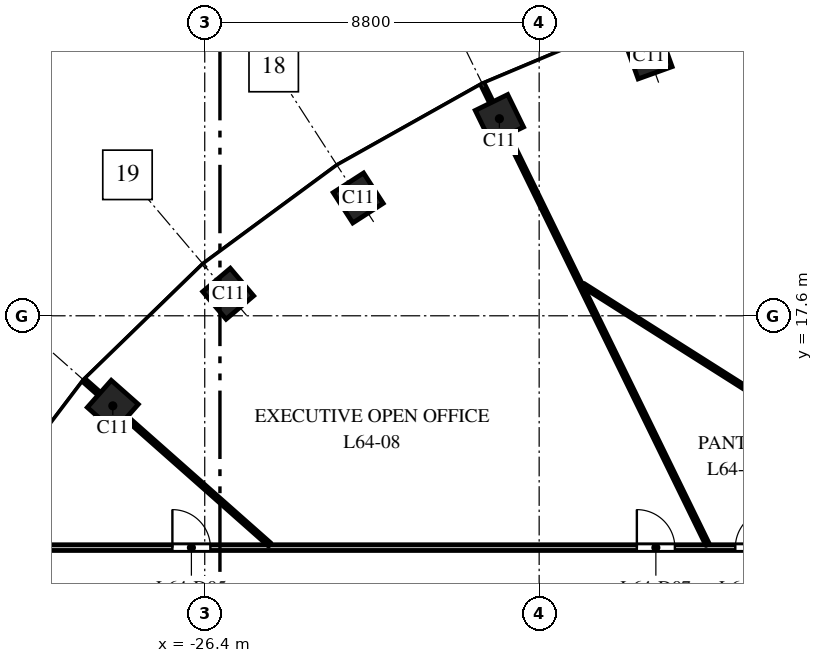
"""IFC4 building model, lengths in metres.
Left out: names, types, materials, properties, quantities, classifications, styles, units other than length and angle.
Written with IfcOpenShell. Run it as: python <this file> out.ifc"""

import sys

from ifc_helpers import new_model, si_unit, direction, frame, frame_2d, origin, origin_2d, place, context, subcontext, project, spatial, rectangle, extrude, element, fill, save


model = new_model("IFC4")
c1 = context("Model", 3, precision=1e-05, world=origin(), true_north=direction((0.0, 1.0)))
c2 = subcontext(c1, "Body", "Model", "MODEL_VIEW")
j1 = project(units=[si_unit("LENGTHUNIT", "METRE"), si_unit("PLANEANGLEUNIT", "RADIAN")], contexts=[c1])
p1 = place(None, origin())
s1 = spatial("IfcSite", under=j1, at=p1, CompositionType="ELEMENT")
p2 = place(p1, origin())
s2 = spatial("IfcBuilding", under=s1, at=p2, CompositionType="ELEMENT")
p3 = place(p2, frame((0.0, 0.0, 299.0)))
s3 = spatial("IfcBuildingStorey", under=s2, at=p3, CompositionType="ELEMENT", Elevation=299.0)
for number, where, z_axis, x_axis in (
    (1, (-14.709, 24.441, 0.0), (0.0, 0.0, 1.0), (-0.941, -0.338, 0.0)),
    (2, (-18.646, 22.785, 0.0), (0.0, 0.0, 1.0), (-0.898, -0.439, 0.0)),
    (3, (-22.362, 20.7, 0.0), (0.0, 0.0, 1.0), (-0.84, -0.542, 0.0)),
    (4, (-25.783, 18.18, 0.0), (0.0, 0.0, 1.0), (-0.763, -0.646, 0.0)),
    (5, (-28.819, 15.23, 0.0), (0.0, 0.0, 1.0), (-0.663, -0.749, 0.0)),
):
    element("IfcColumn", number, at=place(p3, frame(where, z_axis=z_axis, x_axis=x_axis)), inside=s3, PredefinedType="COLUMN", context=c2, shape_type="SweptSolid", body=[
        extrude(rectangle(XDim=0.95, YDim=0.95, at=origin_2d()), origin(), (0.0, 0.0, 1.0), 4.0),
    ])
p4 = place(p3, frame((-31.5, 11.5, 0.0), z_axis=(0.0, 0.0, 1.0), x_axis=(1.0, 0.0, 0.0)))
e6 = element("IfcWall", 6, at=p4, inside=s3, PredefinedType="PARTITIONING", context=c2, shape_type="SweptSolid", body=[
    extrude(rectangle(XDim=29.768, YDim=0.15, at=frame_2d((14.884, 0.0))), origin(), (0.0, 0.0, 1.0), 2.75),
])
p5 = place(p4, frame((4.249, 0.0, 0.0)))
e7 = element("IfcOpeningElement", 7, at=p5, cuts=e6, PredefinedType="OPENING", context=c2, shape_type="SweptSolid", body=[
    extrude(rectangle(XDim=1.0, YDim=2.1, at=frame_2d((0.5, 1.05))), frame((0.0, 0.085, 0.0), z_axis=(0.0, -1.0, 0.0), x_axis=(1.0, 0.0, 0.0)), (0.0, 0.0, 1.0), 0.17),
])
p6 = place(p4, frame((16.471, 0.0, 0.0)))
e8 = element("IfcOpeningElement", 8, at=p6, cuts=e6, PredefinedType="OPENING", context=c2, shape_type="SweptSolid", body=[
    extrude(rectangle(XDim=1.0, YDim=2.1, at=frame_2d((0.5, 1.05))), frame((0.0, 0.085, 0.0), z_axis=(0.0, -1.0, 0.0), x_axis=(1.0, 0.0, 0.0)), (0.0, 0.0, 1.0), 0.17),
])
p7 = place(p4, frame((28.076, 0.0, 0.0)))
e9 = element("IfcOpeningElement", 9, at=p7, cuts=e6, PredefinedType="OPENING", context=c2, shape_type="SweptSolid", body=[
    extrude(rectangle(XDim=1.0, YDim=2.1, at=frame_2d((0.5, 1.05))), frame((0.0, 0.085, 0.0), z_axis=(0.0, -1.0, 0.0), x_axis=(1.0, 0.0, 0.0)), (0.0, 0.0, 1.0), 0.17),
])
p8 = place(p4, frame((19.062, 0.0, 0.0)))
e10 = element("IfcOpeningElement", 10, at=p8, cuts=e6, PredefinedType="OPENING", context=c2, shape_type="SweptSolid", body=[
    extrude(rectangle(XDim=1.0, YDim=2.1, at=frame_2d((0.5, 1.05))), frame((0.0, 0.085, 0.0), z_axis=(0.0, -1.0, 0.0), x_axis=(1.0, 0.0, 0.0)), (0.0, 0.0, 1.0), 0.17),
])
p9 = place(p3, frame((-29.569, 15.895, 0.0), z_axis=(0.0, 0.0, 1.0), x_axis=(0.748988695283, -0.662582775461, 0.0)))
e11 = element("IfcWall", 11, at=p9, inside=s3, PredefinedType="PARTITIONING", context=c2, shape_type="SweptSolid", body=[
    extrude(rectangle(XDim=6.516, YDim=0.1, at=frame_2d((3.258, 0.0))), origin(), (0.0, 0.0, 1.0), 3.0),
])
p10 = place(p3, frame((-19.086, 23.685, 0.0), z_axis=(0.0, 0.0, 1.0), x_axis=(0.439180235984, -0.898398976135, 0.0)))
e12 = element("IfcWall", 12, at=p10, inside=s3, PredefinedType="PARTITIONING", context=c2, shape_type="SweptSolid", body=[
    extrude(rectangle(XDim=13.475, YDim=0.1, at=frame_2d((6.738, 0.0))), origin(), (0.0, 0.0, 1.0), 2.75),
])
p11 = place(p3, frame((-16.452, 18.412, 0.0), z_axis=(0.0, 0.0, 1.0), x_axis=(0.844827711376, -0.535038445434, 0.0)))
e13 = element("IfcWall", 13, at=p11, inside=s3, PredefinedType="PARTITIONING", context=c2, shape_type="SweptSolid", body=[
    extrude(rectangle(XDim=12.779, YDim=0.1, at=frame_2d((6.389, 0.0))), origin(), (0.0, 0.0, 1.0), 2.75),
])
p12 = place(p5, origin())
e14 = element("IfcDoor", 14, at=p12, inside=s3, OperationType="SINGLE_SWING_LEFT", PredefinedType="DOOR", context=c2, shape_type="SweptSolid", body=[
    extrude(rectangle(XDim=1.0, YDim=2.1, at=frame_2d((0.5, 1.05))), frame((0.0, 0.025, 0.0), z_axis=(0.0, -1.0, 0.0), x_axis=(1.0, 0.0, 0.0)), (0.0, 0.0, 1.0), 0.05),
])
fill(e7, e14)
p13 = place(p6, origin())
e15 = element("IfcDoor", 15, at=p13, inside=s3, OperationType="SINGLE_SWING_LEFT", PredefinedType="DOOR", context=c2, shape_type="SweptSolid", body=[
    extrude(rectangle(XDim=1.0, YDim=2.1, at=frame_2d((0.5, 1.05))), frame((0.0, 0.025, 0.0), z_axis=(0.0, -1.0, 0.0), x_axis=(1.0, 0.0, 0.0)), (0.0, 0.0, 1.0), 0.05),
])
fill(e8, e15)
p14 = place(p8, origin())
e16 = element("IfcDoor", 16, at=p14, inside=s3, OperationType="SINGLE_SWING_RIGHT", PredefinedType="DOOR", context=c2, shape_type="SweptSolid", body=[
    extrude(rectangle(XDim=1.0, YDim=2.1, at=frame_2d((0.5, 1.05))), frame((0.0, 0.025, 0.0), z_axis=(0.0, -1.0, 0.0), x_axis=(1.0, 0.0, 0.0)), (0.0, 0.0, 1.0), 0.05),
])
fill(e10, e16)
save(model, sys.argv[1])
